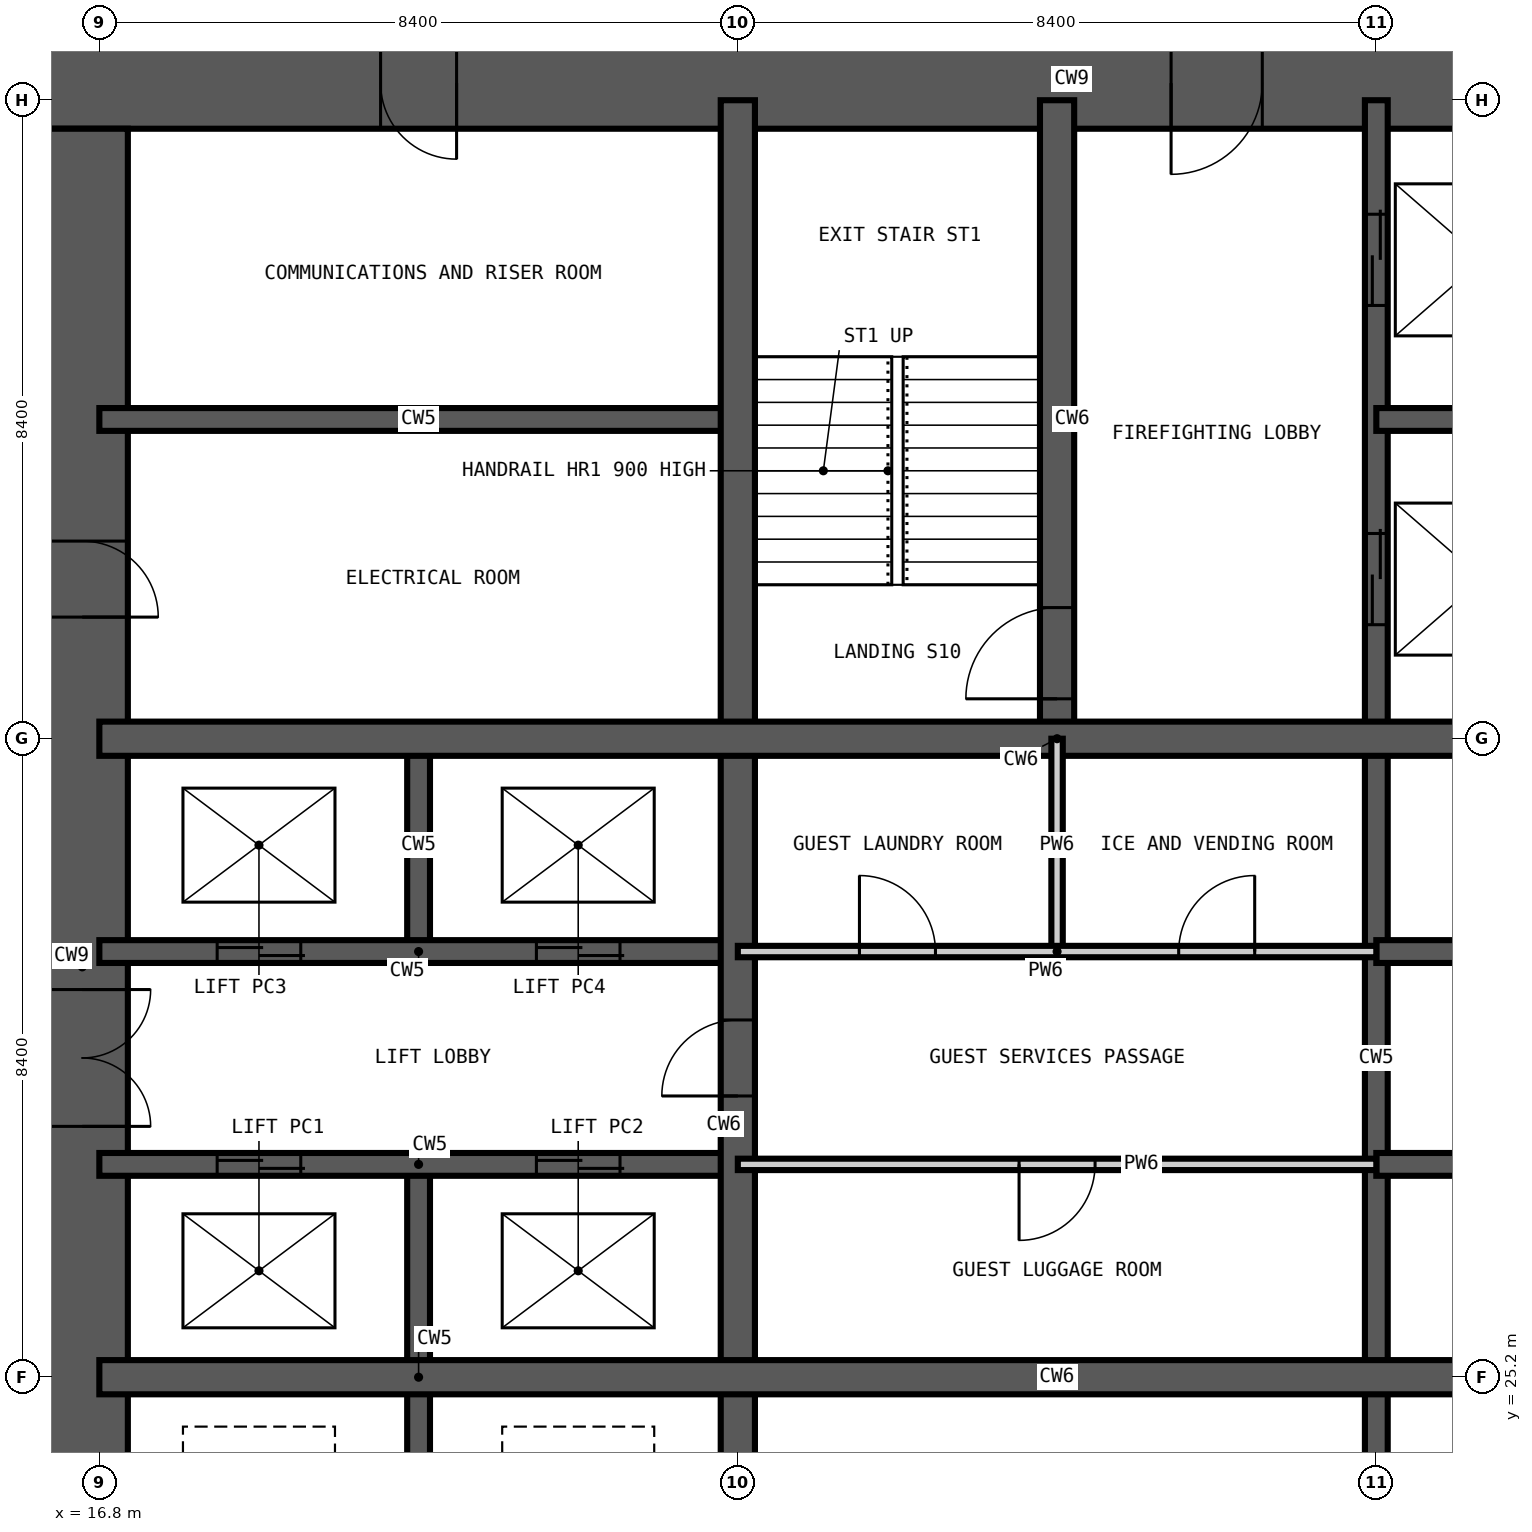
"""IFC4 building model, lengths in metres.
Left out: names, types, materials, properties, quantities, classifications, styles, units other than length and angle.
Written with IfcOpenShell. Run it as: python <this file> out.ifc"""

import sys

from ifc_helpers import new_model, si_unit, direction, frame, frame_2d, origin, place, context, subcontext, project, spatial, rectangle, extrude, element, fill, save


model = new_model("IFC4")
c1 = context("Model", 3, precision=1e-05, world=origin(), true_north=direction((0.0, 1.0)))
c2 = subcontext(c1, "Body", "Model", "MODEL_VIEW")
j1 = project(units=[si_unit("LENGTHUNIT", "METRE"), si_unit("PLANEANGLEUNIT", "RADIAN")], contexts=[c1])
p1 = place(None, origin())
s1 = spatial("IfcSite", under=j1, at=p1, CompositionType="ELEMENT")
p2 = place(p1, origin())
s2 = spatial("IfcBuilding", under=s1, at=p2, CompositionType="ELEMENT")
p3 = place(p2, frame((0.0, 0.0, 100.8)))
s3 = spatial("IfcBuildingStorey", under=s2, at=p3, CompositionType="ELEMENT", Elevation=100.8)
p4 = place(p3, frame((42.825, 42.225, -0.35), z_axis=(0.0, 0.0, 1.0), x_axis=(-1.0, 0.0, 0.0)))
e1 = element("IfcWall", 1, at=p4, inside=s3, PredefinedType="SHEAR", context=c2, shape_type="SweptSolid", body=[
    extrude(rectangle(XDim=26.85, YDim=1.2, at=frame_2d((13.425, 0.0))), origin(), (0.0, 0.0, 1.0), 3.6),
])
p5 = place(p4, frame((21.325, 0.0, 0.35)))
e2 = element("IfcOpeningElement", 2, at=p5, cuts=e1, PredefinedType="OPENING", context=c2, shape_type="SweptSolid", body=[
    extrude(rectangle(XDim=1.0, YDim=2.1, at=frame_2d((0.5, 1.05))), frame((0.0, 0.61, 0.0), z_axis=(0.0, -1.0, 0.0), x_axis=(1.0, 0.0, 0.0)), (0.0, 0.0, 1.0), 1.22),
])
p6 = place(p4, frame((10.725, 0.0, 0.35)))
e3 = element("IfcOpeningElement", 3, at=p6, cuts=e1, PredefinedType="OPENING", context=c2, shape_type="SweptSolid", body=[
    extrude(rectangle(XDim=1.2, YDim=2.2, at=frame_2d((0.6, 1.1))), frame((0.0, 0.61, 0.0), z_axis=(0.0, -1.0, 0.0), x_axis=(1.0, 0.0, 0.0)), (0.0, 0.0, 1.0), 1.22),
])
p7 = place(p3, frame((16.575, 41.625, -0.35), z_axis=(0.0, 0.0, 1.0), x_axis=(0.0, -1.0, 0.0)))
e4 = element("IfcWall", 4, at=p7, inside=s3, PredefinedType="SHEAR", context=c2, shape_type="SweptSolid", body=[
    extrude(rectangle(XDim=24.45, YDim=1.2, at=frame_2d((12.225, 0.0))), origin(), (0.0, 0.0, 1.0), 3.6),
])
p8 = place(p7, frame((11.325, 0.0, 0.35)))
e5 = element("IfcOpeningElement", 5, at=p8, cuts=e4, PredefinedType="OPENING", context=c2, shape_type="SweptSolid", body=[
    extrude(rectangle(XDim=1.8, YDim=2.2, at=frame_2d((0.9, 1.1))), frame((0.0, 0.61, 0.0), z_axis=(0.0, -1.0, 0.0), x_axis=(1.0, 0.0, 0.0)), (0.0, 0.0, 1.0), 1.22),
])
p9 = place(p7, frame((20.125, 0.0, 0.35)))
e6 = element("IfcOpeningElement", 6, at=p9, cuts=e4, PredefinedType="OPENING", context=c2, shape_type="SweptSolid", body=[
    extrude(rectangle(XDim=1.0, YDim=2.1, at=frame_2d((0.5, 1.05))), frame((0.0, 0.61, 0.0), z_axis=(0.0, -1.0, 0.0), x_axis=(1.0, 0.0, 0.0)), (0.0, 0.0, 1.0), 1.22),
])
p10 = place(p7, frame((5.425, 0.0, 0.35)))
e7 = element("IfcOpeningElement", 7, at=p10, cuts=e4, PredefinedType="OPENING", context=c2, shape_type="SweptSolid", body=[
    extrude(rectangle(XDim=1.0, YDim=2.1, at=frame_2d((0.5, 1.05))), frame((0.0, 0.61, 0.0), z_axis=(0.0, -1.0, 0.0), x_axis=(1.0, 0.0, 0.0)), (0.0, 0.0, 1.0), 1.22),
])
p11 = place(p3, frame((21.0, 22.4, -0.35), z_axis=(0.0, 0.0, 1.0), x_axis=(0.0, 1.0, 0.0)))
e8 = element("IfcWall", 8, at=p11, inside=s3, PredefinedType="SHEAR", context=c2, shape_type="SweptSolid", body=[
    extrude(rectangle(XDim=5.6, YDim=0.3, at=frame_2d((2.8, 0.0))), origin(), (0.0, 0.0, 1.0), 3.6),
])
p12 = place(p3, frame((21.0, 30.8, -0.35), z_axis=(0.0, 0.0, 1.0), x_axis=(0.0, 1.0, 0.0)))
e9 = element("IfcWall", 9, at=p12, inside=s3, PredefinedType="SHEAR", context=c2, shape_type="SweptSolid", body=[
    extrude(rectangle(XDim=2.8, YDim=0.3, at=frame_2d((1.4, 0.0))), origin(), (0.0, 0.0, 1.0), 3.6),
])
p13 = place(p3, frame((33.6, 16.8, -0.35), z_axis=(0.0, 0.0, 1.0), x_axis=(0.0, 1.0, 0.0)))
e10 = element("IfcWall", 10, at=p13, inside=s3, PredefinedType="SHEAR", context=c2, shape_type="SweptSolid", body=[
    extrude(rectangle(XDim=25.2, YDim=0.3, at=frame_2d((12.6, 0.0))), origin(), (0.0, 0.0, 1.0), 3.6),
])
p14 = place(p13, frame((22.5, 0.0, 0.35)))
e11 = element("IfcOpeningElement", 11, at=p14, cuts=e10, PredefinedType="OPENING", context=c2, shape_type="SweptSolid", body=[
    extrude(rectangle(XDim=1.2, YDim=2.2, at=frame_2d((0.6, 1.1))), frame((0.0, 0.16, 0.0), z_axis=(0.0, -1.0, 0.0), x_axis=(1.0, 0.0, 0.0)), (0.0, 0.0, 1.0), 0.32),
])
p15 = place(p13, frame((18.3, 0.0, 0.35)))
e12 = element("IfcOpeningElement", 12, at=p15, cuts=e10, PredefinedType="OPENING", context=c2, shape_type="SweptSolid", body=[
    extrude(rectangle(XDim=1.2, YDim=2.2, at=frame_2d((0.6, 1.1))), frame((0.0, 0.16, 0.0), z_axis=(0.0, -1.0, 0.0), x_axis=(1.0, 0.0, 0.0)), (0.0, 0.0, 1.0), 0.32),
])
p16 = place(p3, frame((16.8, 28.0, -0.35), z_axis=(0.0, 0.0, 1.0), x_axis=(1.0, 0.0, 0.0)))
e13 = element("IfcWall", 13, at=p16, inside=s3, PredefinedType="SHEAR", context=c2, shape_type="SweptSolid", body=[
    extrude(rectangle(XDim=8.4, YDim=0.3, at=frame_2d((4.2, 0.0))), origin(), (0.0, 0.0, 1.0), 3.6),
])
p17 = place(p16, frame((1.55, 0.0, 0.35)))
e14 = element("IfcOpeningElement", 14, at=p17, cuts=e13, PredefinedType="OPENING", context=c2, shape_type="SweptSolid", body=[
    extrude(rectangle(XDim=1.1, YDim=2.2, at=frame_2d((0.55, 1.1))), frame((0.0, 0.16, 0.0), z_axis=(0.0, -1.0, 0.0), x_axis=(1.0, 0.0, 0.0)), (0.0, 0.0, 1.0), 0.32),
])
p18 = place(p16, frame((5.75, 0.0, 0.35)))
e15 = element("IfcOpeningElement", 15, at=p18, cuts=e13, PredefinedType="OPENING", context=c2, shape_type="SweptSolid", body=[
    extrude(rectangle(XDim=1.1, YDim=2.2, at=frame_2d((0.55, 1.1))), frame((0.0, 0.16, 0.0), z_axis=(0.0, -1.0, 0.0), x_axis=(1.0, 0.0, 0.0)), (0.0, 0.0, 1.0), 0.32),
])
p19 = place(p3, frame((33.6, 28.0, -0.35), z_axis=(0.0, 0.0, 1.0), x_axis=(1.0, 0.0, 0.0)))
e16 = element("IfcWall", 16, at=p19, inside=s3, PredefinedType="SHEAR", context=c2, shape_type="SweptSolid", body=[
    extrude(rectangle(XDim=8.4, YDim=0.3, at=frame_2d((4.2, 0.0))), origin(), (0.0, 0.0, 1.0), 3.6),
])
p20 = place(p19, frame((1.55, 0.0, 0.35)))
e17 = element("IfcOpeningElement", 17, at=p20, cuts=e16, PredefinedType="OPENING", context=c2, shape_type="SweptSolid", body=[
    extrude(rectangle(XDim=1.1, YDim=2.2, at=frame_2d((0.55, 1.1))), frame((0.0, 0.16, 0.0), z_axis=(0.0, -1.0, 0.0), x_axis=(1.0, 0.0, 0.0)), (0.0, 0.0, 1.0), 0.32),
])
p21 = place(p19, frame((5.75, 0.0, 0.35)))
e18 = element("IfcOpeningElement", 18, at=p21, cuts=e16, PredefinedType="OPENING", context=c2, shape_type="SweptSolid", body=[
    extrude(rectangle(XDim=1.1, YDim=2.2, at=frame_2d((0.55, 1.1))), frame((0.0, 0.16, 0.0), z_axis=(0.0, -1.0, 0.0), x_axis=(1.0, 0.0, 0.0)), (0.0, 0.0, 1.0), 0.32),
])
p22 = place(p3, frame((16.8, 30.8, -0.35), z_axis=(0.0, 0.0, 1.0), x_axis=(1.0, 0.0, 0.0)))
e19 = element("IfcWall", 19, at=p22, inside=s3, PredefinedType="SHEAR", context=c2, shape_type="SweptSolid", body=[
    extrude(rectangle(XDim=8.4, YDim=0.3, at=frame_2d((4.2, 0.0))), origin(), (0.0, 0.0, 1.0), 3.6),
])
p23 = place(p22, frame((1.55, 0.0, 0.35)))
e20 = element("IfcOpeningElement", 20, at=p23, cuts=e19, PredefinedType="OPENING", context=c2, shape_type="SweptSolid", body=[
    extrude(rectangle(XDim=1.1, YDim=2.2, at=frame_2d((0.55, 1.1))), frame((0.0, 0.16, 0.0), z_axis=(0.0, -1.0, 0.0), x_axis=(1.0, 0.0, 0.0)), (0.0, 0.0, 1.0), 0.32),
])
p24 = place(p22, frame((5.75, 0.0, 0.35)))
e21 = element("IfcOpeningElement", 21, at=p24, cuts=e19, PredefinedType="OPENING", context=c2, shape_type="SweptSolid", body=[
    extrude(rectangle(XDim=1.1, YDim=2.2, at=frame_2d((0.55, 1.1))), frame((0.0, 0.16, 0.0), z_axis=(0.0, -1.0, 0.0), x_axis=(1.0, 0.0, 0.0)), (0.0, 0.0, 1.0), 0.32),
])
for number, where, z_axis, x_axis in (
    (22, (33.6, 30.8, -0.35), (0.0, 0.0, 1.0), (1.0, 0.0, 0.0)),
    (23, (16.8, 37.8, -0.35), (0.0, 0.0, 1.0), (1.0, 0.0, 0.0)),
):
    element("IfcWall", number, at=place(p3, frame(where, z_axis=z_axis, x_axis=x_axis)), inside=s3, PredefinedType="SHEAR", context=c2, shape_type="SweptSolid", body=[
        extrude(rectangle(XDim=8.4, YDim=0.3, at=frame_2d((4.2, 0.0))), origin(), (0.0, 0.0, 1.0), 3.6),
    ])
p25 = place(p3, frame((33.6, 37.8, -0.35), z_axis=(0.0, 0.0, 1.0), x_axis=(1.0, 0.0, 0.0)))
e24 = element("IfcWall", 24, at=p25, inside=s3, PredefinedType="SHEAR", context=c2, shape_type="SweptSolid", body=[
    extrude(rectangle(XDim=2.8, YDim=0.3, at=frame_2d((1.4, 0.0))), origin(), (0.0, 0.0, 1.0), 3.6),
])
p26 = place(p3, frame((25.2, 16.8, -0.35), z_axis=(0.0, 0.0, 1.0), x_axis=(0.0, 1.0, 0.0)))
e25 = element("IfcWall", 25, at=p26, inside=s3, PredefinedType="SHEAR", context=c2, shape_type="SweptSolid", body=[
    extrude(rectangle(XDim=25.2, YDim=0.45, at=frame_2d((12.6, 0.0))), origin(), (0.0, 0.0, 1.0), 3.6),
])
p27 = place(p26, frame((12.1, 0.0, 0.35)))
e26 = element("IfcOpeningElement", 26, at=p27, cuts=e25, PredefinedType="OPENING", context=c2, shape_type="SweptSolid", body=[
    extrude(rectangle(XDim=1.0, YDim=2.1, at=frame_2d((0.5, 1.05))), frame((0.0, 0.235, 0.0), z_axis=(0.0, -1.0, 0.0), x_axis=(1.0, 0.0, 0.0)), (0.0, 0.0, 1.0), 0.47),
])
p28 = place(p3, frame((29.4, 33.6, -0.35), z_axis=(0.0, 0.0, 1.0), x_axis=(0.0, 1.0, 0.0)))
e27 = element("IfcWall", 27, at=p28, inside=s3, PredefinedType="SHEAR", context=c2, shape_type="SweptSolid", body=[
    extrude(rectangle(XDim=8.4, YDim=0.45, at=frame_2d((4.2, 0.0))), origin(), (0.0, 0.0, 1.0), 3.6),
])
p29 = place(p28, frame((0.525, 0.0, 0.35)))
e28 = element("IfcOpeningElement", 28, at=p29, cuts=e27, PredefinedType="OPENING", context=c2, shape_type="SweptSolid", body=[
    extrude(rectangle(XDim=1.2, YDim=2.2, at=frame_2d((0.6, 1.1))), frame((0.0, 0.235, 0.0), z_axis=(0.0, -1.0, 0.0), x_axis=(1.0, 0.0, 0.0)), (0.0, 0.0, 1.0), 0.47),
])
p30 = place(p3, frame((16.8, 25.2, -0.35), z_axis=(0.0, 0.0, 1.0), x_axis=(1.0, 0.0, 0.0)))
e29 = element("IfcWall", 29, at=p30, inside=s3, PredefinedType="SHEAR", context=c2, shape_type="SweptSolid", body=[
    extrude(rectangle(XDim=25.2, YDim=0.45, at=frame_2d((12.6, 0.0))), origin(), (0.0, 0.0, 1.0), 3.6),
])
p31 = place(p3, frame((16.8, 33.6, -0.35), z_axis=(0.0, 0.0, 1.0), x_axis=(1.0, 0.0, 0.0)))
e30 = element("IfcWall", 30, at=p31, inside=s3, PredefinedType="SHEAR", context=c2, shape_type="SweptSolid", body=[
    extrude(rectangle(XDim=25.2, YDim=0.45, at=frame_2d((12.6, 0.0))), origin(), (0.0, 0.0, 1.0), 3.6),
])
p32 = place(p31, frame((23.3, 0.0, 0.35)))
e31 = element("IfcOpeningElement", 31, at=p32, cuts=e30, PredefinedType="OPENING", context=c2, shape_type="SweptSolid", body=[
    extrude(rectangle(XDim=1.0, YDim=2.1, at=frame_2d((0.5, 1.05))), frame((0.0, 0.235, 0.0), z_axis=(0.0, -1.0, 0.0), x_axis=(1.0, 0.0, 0.0)), (0.0, 0.0, 1.0), 0.47),
])
p33 = place(p3, frame((29.4, 30.8, 0.0), z_axis=(0.0, 0.0, 1.0), x_axis=(0.0, 1.0, 0.0)))
e32 = element("IfcWall", 32, at=p33, inside=s3, PredefinedType="PARTITIONING", context=c2, shape_type="SweptSolid", body=[
    extrude(rectangle(XDim=2.8, YDim=0.15, at=frame_2d((1.4, 0.0))), origin(), (0.0, 0.0, 1.0), 3.25),
])
p34 = place(p3, frame((25.2, 28.0, 0.0), z_axis=(0.0, 0.0, 1.0), x_axis=(1.0, 0.0, 0.0)))
e33 = element("IfcWall", 33, at=p34, inside=s3, PredefinedType="PARTITIONING", context=c2, shape_type="SweptSolid", body=[
    extrude(rectangle(XDim=8.4, YDim=0.15, at=frame_2d((4.2, 0.0))), origin(), (0.0, 0.0, 1.0), 3.25),
])
p35 = place(p34, frame((3.7, 0.0, 0.0)))
e34 = element("IfcOpeningElement", 34, at=p35, cuts=e33, PredefinedType="OPENING", context=c2, shape_type="SweptSolid", body=[
    extrude(rectangle(XDim=1.0, YDim=2.1, at=frame_2d((0.5, 1.05))), frame((0.0, 0.085, 0.0), z_axis=(0.0, -1.0, 0.0), x_axis=(1.0, 0.0, 0.0)), (0.0, 0.0, 1.0), 0.17),
])
p36 = place(p3, frame((25.2, 30.8, 0.0), z_axis=(0.0, 0.0, 1.0), x_axis=(1.0, 0.0, 0.0)))
e35 = element("IfcWall", 35, at=p36, inside=s3, PredefinedType="PARTITIONING", context=c2, shape_type="SweptSolid", body=[
    extrude(rectangle(XDim=8.4, YDim=0.15, at=frame_2d((4.2, 0.0))), origin(), (0.0, 0.0, 1.0), 3.25),
])
p37 = place(p36, frame((1.6, 0.0, 0.0)))
e36 = element("IfcOpeningElement", 36, at=p37, cuts=e35, PredefinedType="OPENING", context=c2, shape_type="SweptSolid", body=[
    extrude(rectangle(XDim=1.0, YDim=2.1, at=frame_2d((0.5, 1.05))), frame((0.0, 0.085, 0.0), z_axis=(0.0, -1.0, 0.0), x_axis=(1.0, 0.0, 0.0)), (0.0, 0.0, 1.0), 0.17),
])
p38 = place(p36, frame((5.8, 0.0, 0.0)))
e37 = element("IfcOpeningElement", 37, at=p38, cuts=e35, PredefinedType="OPENING", context=c2, shape_type="SweptSolid", body=[
    extrude(rectangle(XDim=1.0, YDim=2.1, at=frame_2d((0.5, 1.05))), frame((0.0, 0.085, 0.0), z_axis=(0.0, -1.0, 0.0), x_axis=(1.0, 0.0, 0.0)), (0.0, 0.0, 1.0), 0.17),
])
p39 = place(p29, origin())
e38 = element("IfcDoor", 38, at=p39, inside=s3, OperationType="SINGLE_SWING_LEFT", PredefinedType="DOOR", context=c2, shape_type="SweptSolid", body=[
    extrude(rectangle(XDim=1.2, YDim=2.2, at=frame_2d((0.6, 1.1))), frame((0.0, 0.025, 0.0), z_axis=(0.0, -1.0, 0.0), x_axis=(1.0, 0.0, 0.0)), (0.0, 0.0, 1.0), 0.05),
])
fill(e28, e38)
p40 = place(p17, origin())
e39 = element("IfcDoor", 39, at=p40, inside=s3, OperationType="DOUBLE_DOOR_SLIDING", PredefinedType="DOOR", context=c2, shape_type="SweptSolid", body=[
    extrude(rectangle(XDim=1.1, YDim=2.2, at=frame_2d((0.55, 1.1))), frame((0.0, 0.025, 0.0), z_axis=(0.0, -1.0, 0.0), x_axis=(1.0, 0.0, 0.0)), (0.0, 0.0, 1.0), 0.05),
])
fill(e14, e39)
p41 = place(p18, origin())
e40 = element("IfcDoor", 40, at=p41, inside=s3, OperationType="DOUBLE_DOOR_SLIDING", PredefinedType="DOOR", context=c2, shape_type="SweptSolid", body=[
    extrude(rectangle(XDim=1.1, YDim=2.2, at=frame_2d((0.55, 1.1))), frame((0.0, 0.025, 0.0), z_axis=(0.0, -1.0, 0.0), x_axis=(1.0, 0.0, 0.0)), (0.0, 0.0, 1.0), 0.05),
])
fill(e15, e40)
p42 = place(p23, origin())
e41 = element("IfcDoor", 41, at=p42, inside=s3, OperationType="DOUBLE_DOOR_SLIDING", PredefinedType="DOOR", context=c2, shape_type="SweptSolid", body=[
    extrude(rectangle(XDim=1.1, YDim=2.2, at=frame_2d((0.55, 1.1))), frame((0.0, 0.025, 0.0), z_axis=(0.0, -1.0, 0.0), x_axis=(1.0, 0.0, 0.0)), (0.0, 0.0, 1.0), 0.05),
])
fill(e20, e41)
p43 = place(p24, origin())
e42 = element("IfcDoor", 42, at=p43, inside=s3, OperationType="DOUBLE_DOOR_SLIDING", PredefinedType="DOOR", context=c2, shape_type="SweptSolid", body=[
    extrude(rectangle(XDim=1.1, YDim=2.2, at=frame_2d((0.55, 1.1))), frame((0.0, 0.025, 0.0), z_axis=(0.0, -1.0, 0.0), x_axis=(1.0, 0.0, 0.0)), (0.0, 0.0, 1.0), 0.05),
])
fill(e21, e42)
p44 = place(p14, origin())
e43 = element("IfcDoor", 43, at=p44, inside=s3, OperationType="DOUBLE_DOOR_SLIDING", PredefinedType="DOOR", context=c2, shape_type="SweptSolid", body=[
    extrude(rectangle(XDim=1.2, YDim=2.2, at=frame_2d((0.6, 1.1))), frame((0.0, 0.025, 0.0), z_axis=(0.0, -1.0, 0.0), x_axis=(1.0, 0.0, 0.0)), (0.0, 0.0, 1.0), 0.05),
])
fill(e11, e43)
p45 = place(p15, origin())
e44 = element("IfcDoor", 44, at=p45, inside=s3, OperationType="DOUBLE_DOOR_SLIDING", PredefinedType="DOOR", context=c2, shape_type="SweptSolid", body=[
    extrude(rectangle(XDim=1.2, YDim=2.2, at=frame_2d((0.6, 1.1))), frame((0.0, 0.025, 0.0), z_axis=(0.0, -1.0, 0.0), x_axis=(1.0, 0.0, 0.0)), (0.0, 0.0, 1.0), 0.05),
])
fill(e12, e44)
p46 = place(p8, origin())
e45 = element("IfcDoor", 45, at=p46, inside=s3, OperationType="DOUBLE_DOOR_DOUBLE_SWING", PredefinedType="DOOR", context=c2, shape_type="SweptSolid", body=[
    extrude(rectangle(XDim=1.8, YDim=2.2, at=frame_2d((0.9, 1.1))), frame((0.0, 0.025, 0.0), z_axis=(0.0, -1.0, 0.0), x_axis=(1.0, 0.0, 0.0)), (0.0, 0.0, 1.0), 0.05),
])
fill(e5, e45)
p47 = place(p10, origin())
e46 = element("IfcDoor", 46, at=p47, inside=s3, OperationType="SINGLE_SWING_RIGHT", PredefinedType="DOOR", context=c2, shape_type="SweptSolid", body=[
    extrude(rectangle(XDim=1.0, YDim=2.1, at=frame_2d((0.5, 1.05))), frame((0.0, 0.025, 0.0), z_axis=(0.0, -1.0, 0.0), x_axis=(1.0, 0.0, 0.0)), (0.0, 0.0, 1.0), 0.05),
])
fill(e7, e46)
p48 = place(p5, origin())
e47 = element("IfcDoor", 47, at=p48, inside=s3, OperationType="SINGLE_SWING_LEFT", PredefinedType="DOOR", context=c2, shape_type="SweptSolid", body=[
    extrude(rectangle(XDim=1.0, YDim=2.1, at=frame_2d((0.5, 1.05))), frame((0.0, 0.025, 0.0), z_axis=(0.0, -1.0, 0.0), x_axis=(1.0, 0.0, 0.0)), (0.0, 0.0, 1.0), 0.05),
])
fill(e2, e47)
p49 = place(p27, origin())
e48 = element("IfcDoor", 48, at=p49, inside=s3, OperationType="SINGLE_SWING_LEFT", PredefinedType="DOOR", context=c2, shape_type="SweptSolid", body=[
    extrude(rectangle(XDim=1.0, YDim=2.1, at=frame_2d((0.5, 1.05))), frame((0.0, 0.025, 0.0), z_axis=(0.0, -1.0, 0.0), x_axis=(1.0, 0.0, 0.0)), (0.0, 0.0, 1.0), 0.05),
])
fill(e26, e48)
p50 = place(p35, frame((1.0, 0.0, 0.0), z_axis=(0.0, 0.0, 1.0), x_axis=(-1.0, 0.0, 0.0)))
e49 = element("IfcDoor", 49, at=p50, inside=s3, OperationType="SINGLE_SWING_RIGHT", PredefinedType="DOOR", context=c2, shape_type="SweptSolid", body=[
    extrude(rectangle(XDim=1.0, YDim=2.1, at=frame_2d((0.5, 1.05))), frame((0.0, 0.025, 0.0), z_axis=(0.0, -1.0, 0.0), x_axis=(1.0, 0.0, 0.0)), (0.0, 0.0, 1.0), 0.05),
])
fill(e34, e49)
p51 = place(p37, origin())
e50 = element("IfcDoor", 50, at=p51, inside=s3, OperationType="SINGLE_SWING_LEFT", PredefinedType="DOOR", context=c2, shape_type="SweptSolid", body=[
    extrude(rectangle(XDim=1.0, YDim=2.1, at=frame_2d((0.5, 1.05))), frame((0.0, 0.025, 0.0), z_axis=(0.0, -1.0, 0.0), x_axis=(1.0, 0.0, 0.0)), (0.0, 0.0, 1.0), 0.05),
])
fill(e36, e50)
p52 = place(p38, origin())
e51 = element("IfcDoor", 51, at=p52, inside=s3, OperationType="SINGLE_SWING_RIGHT", PredefinedType="DOOR", context=c2, shape_type="SweptSolid", body=[
    extrude(rectangle(XDim=1.0, YDim=2.1, at=frame_2d((0.5, 1.05))), frame((0.0, 0.025, 0.0), z_axis=(0.0, -1.0, 0.0), x_axis=(1.0, 0.0, 0.0)), (0.0, 0.0, 1.0), 0.05),
])
fill(e37, e51)
p53 = place(p6, origin())
e52 = element("IfcDoor", 52, at=p53, inside=s3, OperationType="SINGLE_SWING_RIGHT", PredefinedType="DOOR", context=c2, shape_type="SweptSolid", body=[
    extrude(rectangle(XDim=1.2, YDim=2.2, at=frame_2d((0.6, 1.1))), frame((0.0, 0.025, 0.0), z_axis=(0.0, -1.0, 0.0), x_axis=(1.0, 0.0, 0.0)), (0.0, 0.0, 1.0), 0.05),
])
fill(e3, e52)
save(model, sys.argv[1])
